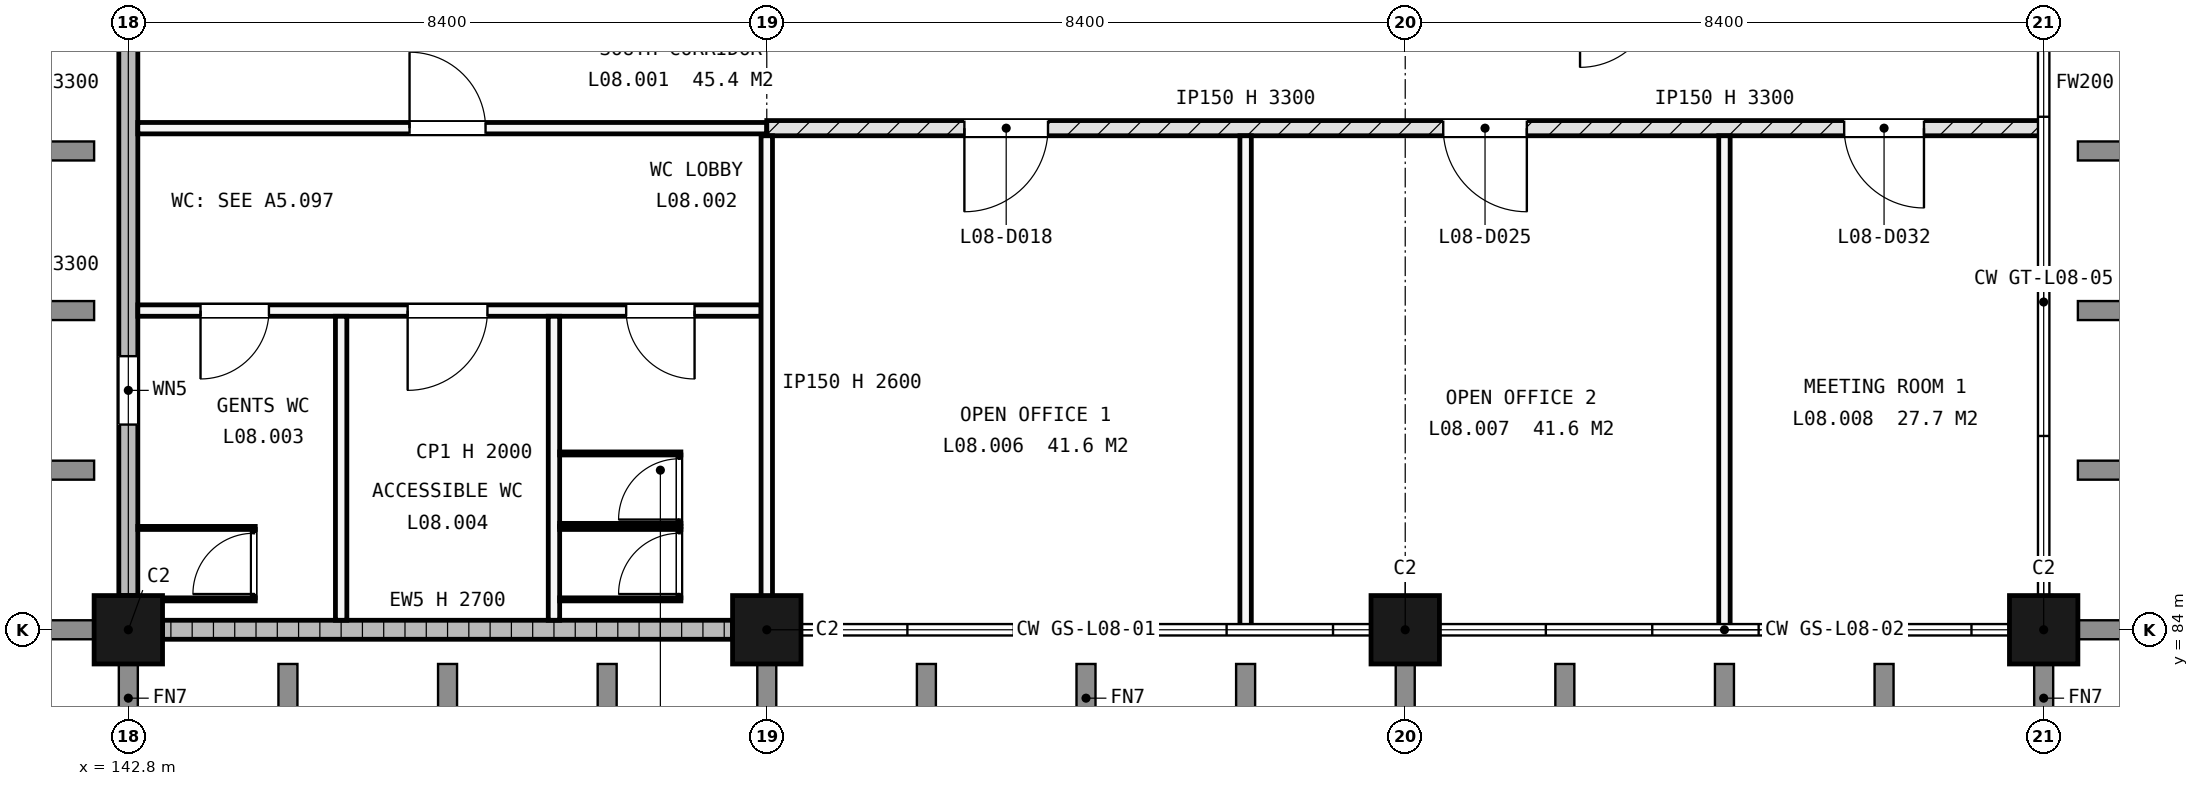
"""IFC4 building model, lengths in metres.
Left out: names, types, materials, properties, quantities, classifications, styles, units other than length and angle.
Written with IfcOpenShell. Run it as: python <this file> out.ifc"""

import sys

from ifc_helpers import new_model, si_unit, direction, frame, frame_2d, origin, origin_2d, place, context, subcontext, project, spatial, rectangle, extrude, element, fill, save


model = new_model("IFC4")
c1 = context("Model", 3, precision=1e-05, world=origin(), true_north=direction((0.0, 1.0)))
c2 = subcontext(c1, "Body", "Model", "MODEL_VIEW")
j1 = project(units=[si_unit("LENGTHUNIT", "METRE"), si_unit("PLANEANGLEUNIT", "RADIAN")], contexts=[c1])
p1 = place(None, origin())
s1 = spatial("IfcSite", under=j1, at=p1, CompositionType="ELEMENT")
p2 = place(p1, origin())
s2 = spatial("IfcBuilding", under=s1, at=p2, CompositionType="ELEMENT")
p3 = place(p2, frame((0.0, 0.0, 32.4)))
s3 = spatial("IfcBuildingStorey", under=s2, at=p3, CompositionType="ELEMENT", Elevation=32.4)
for number, where, z_axis, x_axis in (
    (1, (142.8, 84.0, -0.25), (0.0, 0.0, 1.0), (1.0, 0.0, 0.0)),
    (2, (151.2, 84.0, -0.25), (0.0, 0.0, 1.0), (1.0, 0.0, 0.0)),
    (3, (159.6, 84.0, -0.25), (0.0, 0.0, 1.0), (1.0, 0.0, 0.0)),
    (4, (168.0, 84.0, -0.25), (0.0, 0.0, 1.0), (1.0, 0.0, 0.0)),
):
    element("IfcColumn", number, at=place(p3, frame(where, z_axis=z_axis, x_axis=x_axis)), inside=s3, PredefinedType="COLUMN", context=c2, shape_type="SweptSolid", body=[
        extrude(rectangle(XDim=0.9, YDim=0.9, at=origin_2d()), origin(), (0.0, 0.0, 1.0), 3.6),
    ])
p4 = place(p3, frame((143.25, 84.0, 0.0), z_axis=(0.0, 0.0, 1.0), x_axis=(1.0, 0.0, 0.0)))
e5 = element("IfcWall", 5, at=p4, inside=s3, PredefinedType="STANDARD", context=c2, shape_type="SweptSolid", body=[
    extrude(rectangle(XDim=7.5, YDim=0.25, at=frame_2d((3.75, 0.0))), origin(), (0.0, 0.0, 1.0), 2.7),
])
p5 = place(p3, frame((142.8, 84.45, 0.0), z_axis=(0.0, 0.0, 1.0), x_axis=(0.0, 1.0, 0.0)))
e6 = element("IfcWall", 6, at=p5, inside=s3, PredefinedType="STANDARD", context=c2, shape_type="SweptSolid", body=[
    extrude(rectangle(XDim=7.725, YDim=0.25, at=frame_2d((3.863, 0.0))), origin(), (0.0, 0.0, 1.0), 3.3),
])
p6 = place(p5, frame((2.25, 0.0, 2.1)))
e7 = element("IfcOpeningElement", 7, at=p6, cuts=e6, PredefinedType="OPENING", context=c2, shape_type="SweptSolid", body=[
    extrude(rectangle(XDim=0.9, YDim=0.6, at=frame_2d((0.45, 0.3))), frame((0.0, 0.135, 0.0), z_axis=(0.0, -1.0, 0.0), x_axis=(1.0, 0.0, 0.0)), (0.0, 0.0, 1.0), 0.27),
])
p7 = place(p3, frame((142.925, 88.2, 0.0), z_axis=(0.0, 0.0, 1.0), x_axis=(1.0, 0.0, 0.0)))
e8 = element("IfcWall", 8, at=p7, inside=s3, PredefinedType="PARTITIONING", context=c2, shape_type="SweptSolid", body=[
    extrude(rectangle(XDim=8.2, YDim=0.15, at=frame_2d((4.1, 0.0))), origin(), (0.0, 0.0, 1.0), 3.3),
])
p8 = place(p7, frame((0.825, 0.0, 0.0)))
e9 = element("IfcOpeningElement", 9, at=p8, cuts=e8, PredefinedType="OPENING", context=c2, shape_type="SweptSolid", body=[
    extrude(rectangle(XDim=0.9, YDim=2.1, at=frame_2d((0.45, 1.05))), frame((0.0, 0.085, 0.0), z_axis=(0.0, -1.0, 0.0), x_axis=(1.0, 0.0, 0.0)), (0.0, 0.0, 1.0), 0.17),
])
p9 = place(p7, frame((3.55, 0.0, 0.0)))
e10 = element("IfcOpeningElement", 10, at=p9, cuts=e8, PredefinedType="OPENING", context=c2, shape_type="SweptSolid", body=[
    extrude(rectangle(XDim=1.05, YDim=2.25, at=frame_2d((0.525, 1.125))), frame((0.0, 0.085, 0.0), z_axis=(0.0, -1.0, 0.0), x_axis=(1.0, 0.0, 0.0)), (0.0, 0.0, 1.0), 0.17),
])
p10 = place(p7, frame((6.425, 0.0, 0.0)))
e11 = element("IfcOpeningElement", 11, at=p10, cuts=e8, PredefinedType="OPENING", context=c2, shape_type="SweptSolid", body=[
    extrude(rectangle(XDim=0.9, YDim=2.1, at=frame_2d((0.45, 1.05))), frame((0.0, 0.085, 0.0), z_axis=(0.0, -1.0, 0.0), x_axis=(1.0, 0.0, 0.0)), (0.0, 0.0, 1.0), 0.17),
])
p11 = place(p3, frame((142.925, 90.6, 0.0), z_axis=(0.0, 0.0, 1.0), x_axis=(1.0, 0.0, 0.0)))
e12 = element("IfcWall", 12, at=p11, inside=s3, PredefinedType="PARTITIONING", context=c2, shape_type="SweptSolid", body=[
    extrude(rectangle(XDim=8.275, YDim=0.15, at=frame_2d((4.137, 0.0))), origin(), (0.0, 0.0, 1.0), 3.3),
])
p12 = place(p11, frame((3.575, 0.0, 0.0)))
e13 = element("IfcOpeningElement", 13, at=p12, cuts=e12, PredefinedType="OPENING", context=c2, shape_type="SweptSolid", body=[
    extrude(rectangle(XDim=1.0, YDim=2.1, at=frame_2d((0.5, 1.05))), frame((0.0, 0.085, 0.0), z_axis=(0.0, -1.0, 0.0), x_axis=(1.0, 0.0, 0.0)), (0.0, 0.0, 1.0), 0.17),
])
p13 = place(p3, frame((151.2, 90.6, 0.0), z_axis=(0.0, 0.0, 1.0), x_axis=(1.0, 0.0, 0.0)))
e14 = element("IfcWall", 14, at=p13, inside=s3, PredefinedType="SOLIDWALL", context=c2, shape_type="SweptSolid", body=[
    extrude(rectangle(XDim=16.8, YDim=0.2, at=frame_2d((8.4, 0.0))), origin(), (0.0, 0.0, 1.0), 3.3),
])
p14 = place(p13, frame((2.6, 0.0, 0.0)))
e15 = element("IfcOpeningElement", 15, at=p14, cuts=e14, PredefinedType="OPENING", context=c2, shape_type="SweptSolid", body=[
    extrude(rectangle(XDim=1.1, YDim=2.25, at=frame_2d((0.55, 1.125))), frame((0.0, 0.11, 0.0), z_axis=(0.0, -1.0, 0.0), x_axis=(1.0, 0.0, 0.0)), (0.0, 0.0, 1.0), 0.22),
])
p15 = place(p13, frame((8.9, 0.0, 0.0)))
e16 = element("IfcOpeningElement", 16, at=p15, cuts=e14, PredefinedType="OPENING", context=c2, shape_type="SweptSolid", body=[
    extrude(rectangle(XDim=1.1, YDim=2.25, at=frame_2d((0.55, 1.125))), frame((0.0, 0.11, 0.0), z_axis=(0.0, -1.0, 0.0), x_axis=(1.0, 0.0, 0.0)), (0.0, 0.0, 1.0), 0.22),
])
p16 = place(p13, frame((14.175, 0.0, 0.0)))
e17 = element("IfcOpeningElement", 17, at=p16, cuts=e14, PredefinedType="OPENING", context=c2, shape_type="SweptSolid", body=[
    extrude(rectangle(XDim=1.05, YDim=2.1, at=frame_2d((0.525, 1.05))), frame((0.0, 0.11, 0.0), z_axis=(0.0, -1.0, 0.0), x_axis=(1.0, 0.0, 0.0)), (0.0, 0.0, 1.0), 0.22),
])
for number, where, z_axis, x_axis in (
    (18, (145.6, 84.125, 0.0), (0.0, 0.0, 1.0), (0.0, 1.0, 0.0)),
    (19, (148.4, 84.125, 0.0), (0.0, 0.0, 1.0), (0.0, 1.0, 0.0)),
):
    element("IfcWall", number, at=place(p3, frame(where, z_axis=z_axis, x_axis=x_axis)), inside=s3, PredefinedType="PARTITIONING", context=c2, shape_type="SweptSolid", body=[
        extrude(rectangle(XDim=4.0, YDim=0.15, at=frame_2d((2.0, 0.0))), origin(), (0.0, 0.0, 1.0), 3.3),
    ])
p17 = place(p3, frame((151.2, 84.0, 0.0), z_axis=(0.0, 0.0, 1.0), x_axis=(0.0, 1.0, 0.0)))
e20 = element("IfcWall", 20, at=p17, inside=s3, PredefinedType="PARTITIONING", context=c2, shape_type="SweptSolid", body=[
    extrude(rectangle(XDim=6.5, YDim=0.15, at=frame_2d((3.25, 0.0))), origin(), (0.0, 0.0, 1.0), 2.6),
])
for number, where, z_axis, x_axis in (
    (21, (157.5, 84.0, 0.0), (0.0, 0.0, 1.0), (0.0, 1.0, 0.0)),
    (22, (163.8, 84.0, 0.0), (0.0, 0.0, 1.0), (0.0, 1.0, 0.0)),
):
    element("IfcWall", number, at=place(p3, frame(where, z_axis=z_axis, x_axis=x_axis)), inside=s3, PredefinedType="PARTITIONING", context=c2, shape_type="SweptSolid", body=[
        extrude(rectangle(XDim=6.5, YDim=0.15, at=frame_2d((3.25, 0.0))), origin(), (0.0, 0.0, 1.0), 3.3),
    ])
p18 = place(p3, frame((142.93, 84.4, 0.0), z_axis=(0.0, 0.0, 1.0), x_axis=(1.0, 0.0, 0.0)))
e23 = element("IfcWall", 23, at=p18, inside=s3, PredefinedType="PARTITIONING", context=c2, shape_type="SweptSolid", body=[
    extrude(rectangle(XDim=1.54, YDim=0.04, at=frame_2d((0.77, 0.0))), origin(), (0.0, 0.0, 1.0), 2.0),
])
p19 = place(p3, frame((142.925, 85.34, 0.0), z_axis=(0.0, 0.0, 1.0), x_axis=(1.0, 0.0, 0.0)))
e24 = element("IfcWall", 24, at=p19, inside=s3, PredefinedType="PARTITIONING", context=c2, shape_type="SweptSolid", body=[
    extrude(rectangle(XDim=1.545, YDim=0.04, at=frame_2d((0.772, 0.0))), origin(), (0.0, 0.0, 1.0), 2.0),
])
p20 = place(p3, frame((144.45, 84.42, 0.0), z_axis=(0.0, 0.0, 1.0), x_axis=(0.0, 1.0, 0.0)))
e25 = element("IfcWall", 25, at=p20, inside=s3, PredefinedType="PARTITIONING", context=c2, shape_type="SweptSolid", body=[
    extrude(rectangle(XDim=0.9, YDim=0.04, at=frame_2d((0.45, 0.0))), origin(), (0.0, 0.0, 1.0), 2.0),
])
p21 = place(p20, frame((0.05, 0.0, 0.0)))
e26 = element("IfcOpeningElement", 26, at=p21, cuts=e25, PredefinedType="OPENING", context=c2, shape_type="SweptSolid", body=[
    extrude(rectangle(XDim=0.8, YDim=2.0, at=frame_2d((0.4, 1.0))), frame((0.0, 0.03, 0.0), z_axis=(0.0, -1.0, 0.0), x_axis=(1.0, 0.0, 0.0)), (0.0, 0.0, 1.0), 0.06),
])
for number, where, z_axis, x_axis in (
    (27, (148.475, 84.4, 0.0), (0.0, 0.0, 1.0), (1.0, 0.0, 0.0)),
    (28, (148.475, 85.34, 0.0), (0.0, 0.0, 1.0), (1.0, 0.0, 0.0)),
):
    element("IfcWall", number, at=place(p3, frame(where, z_axis=z_axis, x_axis=x_axis)), inside=s3, PredefinedType="PARTITIONING", context=c2, shape_type="SweptSolid", body=[
        extrude(rectangle(XDim=1.595, YDim=0.04, at=frame_2d((0.797, 0.0))), origin(), (0.0, 0.0, 1.0), 2.0),
    ])
p22 = place(p3, frame((150.05, 84.42, 0.0), z_axis=(0.0, 0.0, 1.0), x_axis=(0.0, 1.0, 0.0)))
e29 = element("IfcWall", 29, at=p22, inside=s3, PredefinedType="PARTITIONING", context=c2, shape_type="SweptSolid", body=[
    extrude(rectangle(XDim=0.9, YDim=0.04, at=frame_2d((0.45, 0.0))), origin(), (0.0, 0.0, 1.0), 2.0),
])
p23 = place(p22, frame((0.05, 0.0, 0.0)))
e30 = element("IfcOpeningElement", 30, at=p23, cuts=e29, PredefinedType="OPENING", context=c2, shape_type="SweptSolid", body=[
    extrude(rectangle(XDim=0.8, YDim=2.0, at=frame_2d((0.4, 1.0))), frame((0.0, 0.03, 0.0), z_axis=(0.0, -1.0, 0.0), x_axis=(1.0, 0.0, 0.0)), (0.0, 0.0, 1.0), 0.06),
])
for number, where, z_axis, x_axis in (
    (31, (148.475, 85.38, 0.0), (0.0, 0.0, 1.0), (1.0, 0.0, 0.0)),
    (32, (148.475, 86.32, 0.0), (0.0, 0.0, 1.0), (1.0, 0.0, 0.0)),
):
    element("IfcWall", number, at=place(p3, frame(where, z_axis=z_axis, x_axis=x_axis)), inside=s3, PredefinedType="PARTITIONING", context=c2, shape_type="SweptSolid", body=[
        extrude(rectangle(XDim=1.595, YDim=0.04, at=frame_2d((0.797, 0.0))), origin(), (0.0, 0.0, 1.0), 2.0),
    ])
p24 = place(p3, frame((150.05, 85.4, 0.0), z_axis=(0.0, 0.0, 1.0), x_axis=(0.0, 1.0, 0.0)))
e33 = element("IfcWall", 33, at=p24, inside=s3, PredefinedType="PARTITIONING", context=c2, shape_type="SweptSolid", body=[
    extrude(rectangle(XDim=0.9, YDim=0.04, at=frame_2d((0.45, 0.0))), origin(), (0.0, 0.0, 1.0), 2.0),
])
p25 = place(p24, frame((0.05, 0.0, 0.0)))
e34 = element("IfcOpeningElement", 34, at=p25, cuts=e33, PredefinedType="OPENING", context=c2, shape_type="SweptSolid", body=[
    extrude(rectangle(XDim=0.8, YDim=2.0, at=frame_2d((0.4, 1.0))), frame((0.0, 0.03, 0.0), z_axis=(0.0, -1.0, 0.0), x_axis=(1.0, 0.0, 0.0)), (0.0, 0.0, 1.0), 0.06),
])
p26 = place(p6, origin())
e35 = element("IfcWindow", 35, at=p26, inside=s3, PartitioningType="SINGLE_PANEL", PredefinedType="WINDOW", context=c2, shape_type="SweptSolid", body=[
    extrude(rectangle(XDim=0.9, YDim=0.6, at=frame_2d((0.45, 0.3))), frame((0.0, 0.03, 0.0), z_axis=(0.0, -1.0, 0.0), x_axis=(1.0, 0.0, 0.0)), (0.0, 0.0, 1.0), 0.06),
])
fill(e7, e35)
p27 = place(p8, origin())
e36 = element("IfcDoor", 36, at=p27, inside=s3, OperationType="SINGLE_SWING_LEFT", PredefinedType="DOOR", context=c2, shape_type="SweptSolid", body=[
    extrude(rectangle(XDim=0.9, YDim=2.1, at=frame_2d((0.45, 1.05))), frame((0.0, 0.025, 0.0), z_axis=(0.0, -1.0, 0.0), x_axis=(1.0, 0.0, 0.0)), (0.0, 0.0, 1.0), 0.05),
])
fill(e9, e36)
p28 = place(p9, origin())
e37 = element("IfcDoor", 37, at=p28, inside=s3, OperationType="SINGLE_SWING_LEFT", PredefinedType="DOOR", context=c2, shape_type="SweptSolid", body=[
    extrude(rectangle(XDim=1.05, YDim=2.25, at=frame_2d((0.525, 1.125))), frame((0.0, 0.025, 0.0), z_axis=(0.0, -1.0, 0.0), x_axis=(1.0, 0.0, 0.0)), (0.0, 0.0, 1.0), 0.05),
])
fill(e10, e37)
p29 = place(p10, origin())
e38 = element("IfcDoor", 38, at=p29, inside=s3, OperationType="SINGLE_SWING_RIGHT", PredefinedType="DOOR", context=c2, shape_type="SweptSolid", body=[
    extrude(rectangle(XDim=0.9, YDim=2.1, at=frame_2d((0.45, 1.05))), frame((0.0, 0.025, 0.0), z_axis=(0.0, -1.0, 0.0), x_axis=(1.0, 0.0, 0.0)), (0.0, 0.0, 1.0), 0.05),
])
fill(e11, e38)
p30 = place(p14, origin())
e39 = element("IfcDoor", 39, at=p30, inside=s3, OperationType="SINGLE_SWING_LEFT", PredefinedType="DOOR", context=c2, shape_type="SweptSolid", body=[
    extrude(rectangle(XDim=1.1, YDim=2.25, at=frame_2d((0.55, 1.125))), frame((0.0, 0.025, 0.0), z_axis=(0.0, -1.0, 0.0), x_axis=(1.0, 0.0, 0.0)), (0.0, 0.0, 1.0), 0.05),
])
fill(e15, e39)
p31 = place(p15, origin())
e40 = element("IfcDoor", 40, at=p31, inside=s3, OperationType="SINGLE_SWING_RIGHT", PredefinedType="DOOR", context=c2, shape_type="SweptSolid", body=[
    extrude(rectangle(XDim=1.1, YDim=2.25, at=frame_2d((0.55, 1.125))), frame((0.0, 0.025, 0.0), z_axis=(0.0, -1.0, 0.0), x_axis=(1.0, 0.0, 0.0)), (0.0, 0.0, 1.0), 0.05),
])
fill(e16, e40)
p32 = place(p16, origin())
e41 = element("IfcDoor", 41, at=p32, inside=s3, OperationType="SINGLE_SWING_RIGHT", PredefinedType="DOOR", context=c2, shape_type="SweptSolid", body=[
    extrude(rectangle(XDim=1.05, YDim=2.1, at=frame_2d((0.525, 1.05))), frame((0.0, 0.025, 0.0), z_axis=(0.0, -1.0, 0.0), x_axis=(1.0, 0.0, 0.0)), (0.0, 0.0, 1.0), 0.05),
])
fill(e17, e41)
p33 = place(p12, origin())
e42 = element("IfcDoor", 42, at=p33, inside=s3, OperationType="SINGLE_SWING_RIGHT", PredefinedType="DOOR", context=c2, shape_type="SweptSolid", body=[
    extrude(rectangle(XDim=1.0, YDim=2.1, at=frame_2d((0.5, 1.05))), frame((0.0, 0.025, 0.0), z_axis=(0.0, -1.0, 0.0), x_axis=(1.0, 0.0, 0.0)), (0.0, 0.0, 1.0), 0.05),
])
fill(e13, e42)
p34 = place(p21, origin())
e43 = element("IfcDoor", 43, at=p34, inside=s3, OperationType="SINGLE_SWING_LEFT", PredefinedType="DOOR", context=c2, shape_type="SweptSolid", body=[
    extrude(rectangle(XDim=0.8, YDim=2.0, at=frame_2d((0.4, 1.0))), frame((0.0, 0.02, 0.0), z_axis=(0.0, -1.0, 0.0), x_axis=(1.0, 0.0, 0.0)), (0.0, 0.0, 1.0), 0.04),
])
fill(e26, e43)
p35 = place(p23, origin())
e44 = element("IfcDoor", 44, at=p35, inside=s3, OperationType="SINGLE_SWING_LEFT", PredefinedType="DOOR", context=c2, shape_type="SweptSolid", body=[
    extrude(rectangle(XDim=0.8, YDim=2.0, at=frame_2d((0.4, 1.0))), frame((0.0, 0.02, 0.0), z_axis=(0.0, -1.0, 0.0), x_axis=(1.0, 0.0, 0.0)), (0.0, 0.0, 1.0), 0.04),
])
fill(e30, e44)
p36 = place(p25, origin())
e45 = element("IfcDoor", 45, at=p36, inside=s3, OperationType="SINGLE_SWING_LEFT", PredefinedType="DOOR", context=c2, shape_type="SweptSolid", body=[
    extrude(rectangle(XDim=0.8, YDim=2.0, at=frame_2d((0.4, 1.0))), frame((0.0, 0.02, 0.0), z_axis=(0.0, -1.0, 0.0), x_axis=(1.0, 0.0, 0.0)), (0.0, 0.0, 1.0), 0.04),
])
fill(e34, e45)
save(model, sys.argv[1])
